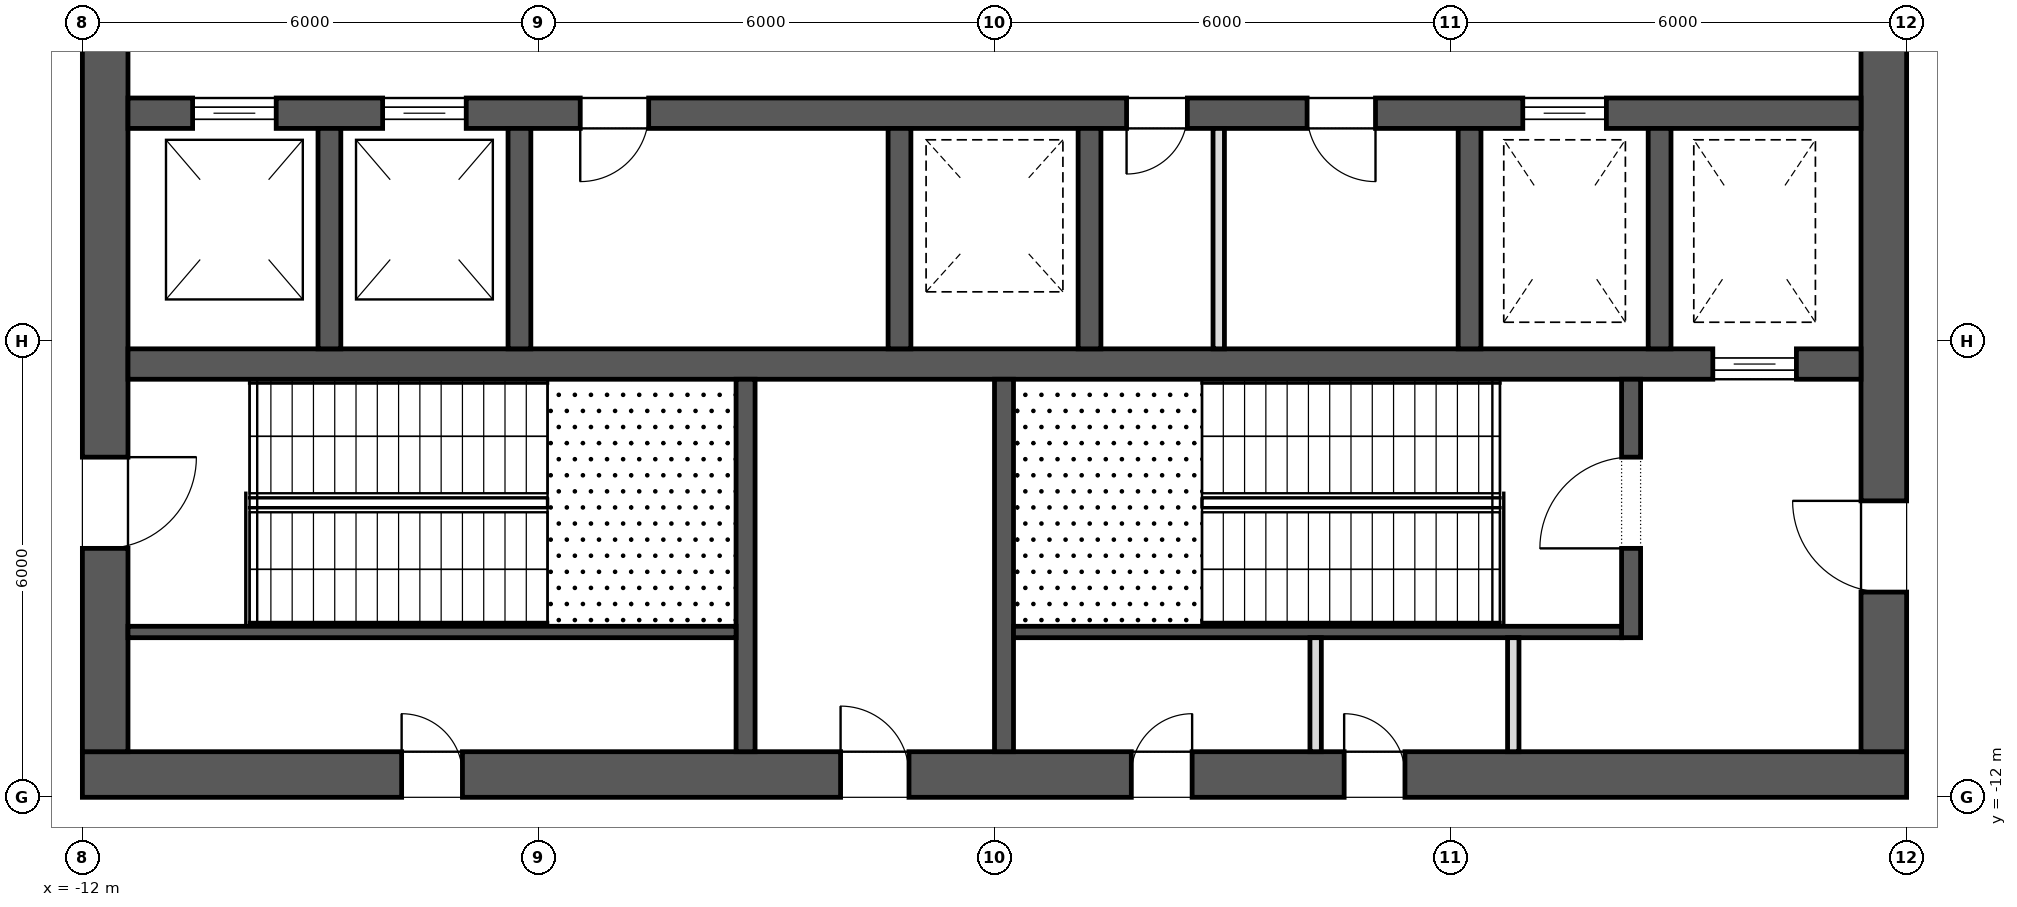
"""IFC4 building model, lengths in metres.
Left out: names, types, materials, properties, quantities, classifications, styles, units other than length and angle.
Written with IfcOpenShell. Run it as: python <this file> out.ifc"""

import sys

from ifc_helpers import new_model, si_unit, direction, frame, frame_2d, origin, place, context, subcontext, project, spatial, rectangle, extrude, element, fill, save


model = new_model("IFC4")
c1 = context("Model", 3, precision=1e-05, world=origin(), true_north=direction((0.0, 1.0)))
c2 = subcontext(c1, "Body", "Model", "MODEL_VIEW")
j1 = project(units=[si_unit("LENGTHUNIT", "METRE"), si_unit("PLANEANGLEUNIT", "RADIAN")], contexts=[c1])
p1 = place(None, origin())
s1 = spatial("IfcSite", under=j1, at=p1, CompositionType="ELEMENT")
p2 = place(p1, origin())
s2 = spatial("IfcBuilding", under=s1, at=p2, CompositionType="ELEMENT")
p3 = place(p2, frame((0.0, 0.0, 333.3)))
s3 = spatial("IfcBuildingStorey", under=s2, at=p3, CompositionType="ELEMENT", Elevation=333.3)
p4 = place(p3, frame((-12.0, -11.7, 0.0), z_axis=(0.0, 0.0, 1.0), x_axis=(1.0, 0.0, 0.0)))
e1 = element("IfcWall", 1, at=p4, inside=s3, PredefinedType="SHEAR", context=c2, shape_type="SweptSolid", body=[
    extrude(rectangle(XDim=24.0, YDim=0.6, at=frame_2d((12.0, 0.0))), origin(), (0.0, 0.0, 1.0), 5.0),
])
p5 = place(p4, frame((9.975, 0.0, 0.0)))
e2 = element("IfcOpeningElement", 2, at=p5, cuts=e1, PredefinedType="OPENING", context=c2, shape_type="SweptSolid", body=[
    extrude(rectangle(XDim=0.9, YDim=2.1, at=frame_2d((0.45, 1.05))), frame((0.0, 0.312, 0.0), z_axis=(0.0, -1.0, 0.0), x_axis=(1.0, 0.0, 0.0)), (0.0, 0.0, 1.0), 0.624),
])
p6 = place(p4, frame((4.2, 0.0, 0.0)))
e3 = element("IfcOpeningElement", 3, at=p6, cuts=e1, PredefinedType="OPENING", context=c2, shape_type="SweptSolid", body=[
    extrude(rectangle(XDim=0.8, YDim=2.1, at=frame_2d((0.4, 1.05))), frame((0.0, 0.312, 0.0), z_axis=(0.0, -1.0, 0.0), x_axis=(1.0, 0.0, 0.0)), (0.0, 0.0, 1.0), 0.624),
])
p7 = place(p4, frame((13.8, 0.0, 0.0)))
e4 = element("IfcOpeningElement", 4, at=p7, cuts=e1, PredefinedType="OPENING", context=c2, shape_type="SweptSolid", body=[
    extrude(rectangle(XDim=0.8, YDim=2.1, at=frame_2d((0.4, 1.05))), frame((0.0, 0.312, 0.0), z_axis=(0.0, -1.0, 0.0), x_axis=(1.0, 0.0, 0.0)), (0.0, 0.0, 1.0), 0.624),
])
p8 = place(p4, frame((16.6, 0.0, 0.0)))
e5 = element("IfcOpeningElement", 5, at=p8, cuts=e1, PredefinedType="OPENING", context=c2, shape_type="SweptSolid", body=[
    extrude(rectangle(XDim=0.8, YDim=2.1, at=frame_2d((0.4, 1.05))), frame((0.0, 0.312, 0.0), z_axis=(0.0, -1.0, 0.0), x_axis=(1.0, 0.0, 0.0)), (0.0, 0.0, 1.0), 0.624),
])
p9 = place(p3, frame((11.7, -11.4, 0.0), z_axis=(0.0, 0.0, 1.0), x_axis=(0.0, 1.0, 0.0)))
e6 = element("IfcWall", 6, at=p9, inside=s3, PredefinedType="SHEAR", context=c2, shape_type="SweptSolid", body=[
    extrude(rectangle(XDim=22.8, YDim=0.6, at=frame_2d((11.4, 0.0))), origin(), (0.0, 0.0, 1.0), 5.0),
])
p10 = place(p9, frame((10.2, 0.0, 0.0)))
e7 = element("IfcOpeningElement", 7, at=p10, cuts=e6, PredefinedType="OPENING", context=c2, shape_type="SweptSolid", body=[
    extrude(rectangle(XDim=2.4, YDim=2.1, at=frame_2d((1.2, 1.05))), frame((0.0, 0.312, 0.0), z_axis=(0.0, -1.0, 0.0), x_axis=(1.0, 0.0, 0.0)), (0.0, 0.0, 1.0), 0.624),
])
p11 = place(p9, frame((19.5, 0.0, 0.0)))
e8 = element("IfcOpeningElement", 8, at=p11, cuts=e6, PredefinedType="OPENING", context=c2, shape_type="SweptSolid", body=[
    extrude(rectangle(XDim=1.2, YDim=2.1, at=frame_2d((0.6, 1.05))), frame((0.0, 0.312, 0.0), z_axis=(0.0, -1.0, 0.0), x_axis=(1.0, 0.0, 0.0)), (0.0, 0.0, 1.0), 0.624),
])
p12 = place(p9, frame((2.1, 0.0, 0.0)))
e9 = element("IfcOpeningElement", 9, at=p12, cuts=e6, PredefinedType="OPENING", context=c2, shape_type="SweptSolid", body=[
    extrude(rectangle(XDim=1.2, YDim=2.1, at=frame_2d((0.6, 1.05))), frame((0.0, 0.312, 0.0), z_axis=(0.0, -1.0, 0.0), x_axis=(1.0, 0.0, 0.0)), (0.0, 0.0, 1.0), 0.624),
])
p13 = place(p3, frame((-11.7, -11.4, 0.0), z_axis=(0.0, 0.0, 1.0), x_axis=(0.0, 1.0, 0.0)))
e10 = element("IfcWall", 10, at=p13, inside=s3, PredefinedType="SHEAR", context=c2, shape_type="SweptSolid", body=[
    extrude(rectangle(XDim=22.8, YDim=0.6, at=frame_2d((11.4, 0.0))), origin(), (0.0, 0.0, 1.0), 5.0),
])
p14 = place(p13, frame((10.2, 0.0, 0.0)))
e11 = element("IfcOpeningElement", 11, at=p14, cuts=e10, PredefinedType="OPENING", context=c2, shape_type="SweptSolid", body=[
    extrude(rectangle(XDim=2.4, YDim=2.1, at=frame_2d((1.2, 1.05))), frame((0.0, 0.312, 0.0), z_axis=(0.0, -1.0, 0.0), x_axis=(1.0, 0.0, 0.0)), (0.0, 0.0, 1.0), 0.624),
])
p15 = place(p13, frame((18.925, 0.0, 0.0)))
e12 = element("IfcOpeningElement", 12, at=p15, cuts=e10, PredefinedType="OPENING", context=c2, shape_type="SweptSolid", body=[
    extrude(rectangle(XDim=1.2, YDim=2.1, at=frame_2d((0.6, 1.05))), frame((0.0, 0.312, 0.0), z_axis=(0.0, -1.0, 0.0), x_axis=(1.0, 0.0, 0.0)), (0.0, 0.0, 1.0), 0.624),
])
p16 = place(p13, frame((2.675, 0.0, 0.0)))
e13 = element("IfcOpeningElement", 13, at=p16, cuts=e10, PredefinedType="OPENING", context=c2, shape_type="SweptSolid", body=[
    extrude(rectangle(XDim=1.2, YDim=2.1, at=frame_2d((0.6, 1.05))), frame((0.0, 0.312, 0.0), z_axis=(0.0, -1.0, 0.0), x_axis=(1.0, 0.0, 0.0)), (0.0, 0.0, 1.0), 0.624),
])
p17 = place(p3, frame((-11.4, -3.0, 0.0), z_axis=(0.0, 0.0, 1.0), x_axis=(1.0, 0.0, 0.0)))
e14 = element("IfcWall", 14, at=p17, inside=s3, PredefinedType="SHEAR", context=c2, shape_type="SweptSolid", body=[
    extrude(rectangle(XDim=22.8, YDim=0.4, at=frame_2d((11.4, 0.0))), origin(), (0.0, 0.0, 1.0), 5.0),
])
p18 = place(p17, frame((0.85, 0.0, 0.0)))
e15 = element("IfcOpeningElement", 15, at=p18, cuts=e14, PredefinedType="OPENING", context=c2, shape_type="SweptSolid", body=[
    extrude(rectangle(XDim=1.1, YDim=2.1, at=frame_2d((0.55, 1.05))), frame((0.0, 0.212, 0.0), z_axis=(0.0, -1.0, 0.0), x_axis=(1.0, 0.0, 0.0)), (0.0, 0.0, 1.0), 0.424),
])
p19 = place(p17, frame((3.35, 0.0, 0.0)))
e16 = element("IfcOpeningElement", 16, at=p19, cuts=e14, PredefinedType="OPENING", context=c2, shape_type="SweptSolid", body=[
    extrude(rectangle(XDim=1.1, YDim=2.1, at=frame_2d((0.55, 1.05))), frame((0.0, 0.212, 0.0), z_axis=(0.0, -1.0, 0.0), x_axis=(1.0, 0.0, 0.0)), (0.0, 0.0, 1.0), 0.424),
])
p20 = place(p17, frame((18.35, 0.0, 0.0)))
e17 = element("IfcOpeningElement", 17, at=p20, cuts=e14, PredefinedType="OPENING", context=c2, shape_type="SweptSolid", body=[
    extrude(rectangle(XDim=1.1, YDim=2.1, at=frame_2d((0.55, 1.05))), frame((0.0, 0.212, 0.0), z_axis=(0.0, -1.0, 0.0), x_axis=(1.0, 0.0, 0.0)), (0.0, 0.0, 1.0), 0.424),
])
p21 = place(p17, frame((13.137, 0.0, 0.0)))
e18 = element("IfcOpeningElement", 18, at=p21, cuts=e14, PredefinedType="OPENING", context=c2, shape_type="SweptSolid", body=[
    extrude(rectangle(XDim=0.8, YDim=2.1, at=frame_2d((0.4, 1.05))), frame((0.0, 0.212, 0.0), z_axis=(0.0, -1.0, 0.0), x_axis=(1.0, 0.0, 0.0)), (0.0, 0.0, 1.0), 0.424),
])
p22 = place(p17, frame((15.512, 0.0, 0.0)))
e19 = element("IfcOpeningElement", 19, at=p22, cuts=e14, PredefinedType="OPENING", context=c2, shape_type="SweptSolid", body=[
    extrude(rectangle(XDim=0.9, YDim=2.1, at=frame_2d((0.45, 1.05))), frame((0.0, 0.212, 0.0), z_axis=(0.0, -1.0, 0.0), x_axis=(1.0, 0.0, 0.0)), (0.0, 0.0, 1.0), 0.424),
])
p23 = place(p17, frame((5.95, 0.0, 0.0)))
e20 = element("IfcOpeningElement", 20, at=p23, cuts=e14, PredefinedType="OPENING", context=c2, shape_type="SweptSolid", body=[
    extrude(rectangle(XDim=0.9, YDim=2.1, at=frame_2d((0.45, 1.05))), frame((0.0, 0.212, 0.0), z_axis=(0.0, -1.0, 0.0), x_axis=(1.0, 0.0, 0.0)), (0.0, 0.0, 1.0), 0.424),
])
p24 = place(p3, frame((-11.4, -6.3, 0.0), z_axis=(0.0, 0.0, 1.0), x_axis=(1.0, 0.0, 0.0)))
e21 = element("IfcWall", 21, at=p24, inside=s3, PredefinedType="SHEAR", context=c2, shape_type="SweptSolid", body=[
    extrude(rectangle(XDim=22.8, YDim=0.4, at=frame_2d((11.4, 0.0))), origin(), (0.0, 0.0, 1.0), 5.0),
])
p25 = place(p24, frame((20.85, 0.0, 0.0)))
e22 = element("IfcOpeningElement", 22, at=p25, cuts=e21, PredefinedType="OPENING", context=c2, shape_type="SweptSolid", body=[
    extrude(rectangle(XDim=1.1, YDim=2.1, at=frame_2d((0.55, 1.05))), frame((0.0, 0.212, 0.0), z_axis=(0.0, -1.0, 0.0), x_axis=(1.0, 0.0, 0.0)), (0.0, 0.0, 1.0), 0.424),
])
for number, where, z_axis, x_axis in (
    (23, (-8.75, -6.1, 0.0), (0.0, 0.0, 1.0), (0.0, 1.0, 0.0)),
    (24, (-6.25, -6.1, 0.0), (0.0, 0.0, 1.0), (0.0, 1.0, 0.0)),
    (25, (-1.25, -6.1, 0.0), (0.0, 0.0, 1.0), (0.0, 1.0, 0.0)),
    (26, (1.25, -6.1, 0.0), (0.0, 0.0, 1.0), (0.0, 1.0, 0.0)),
    (27, (6.25, -6.1, 0.0), (0.0, 0.0, 1.0), (0.0, 1.0, 0.0)),
    (28, (8.75, -6.1, 0.0), (0.0, 0.0, 1.0), (0.0, 1.0, 0.0)),
):
    element("IfcWall", number, at=place(p3, frame(where, z_axis=z_axis, x_axis=x_axis)), inside=s3, PredefinedType="SHEAR", context=c2, shape_type="SweptSolid", body=[
        extrude(rectangle(XDim=2.9, YDim=0.3, at=frame_2d((1.45, 0.0))), origin(), (0.0, 0.0, 1.0), 5.0),
    ])
for number, where, z_axis, x_axis in (
    (29, (-3.275, -11.4, 0.0), (0.0, 0.0, 1.0), (0.0, 1.0, 0.0)),
    (30, (0.125, -11.4, 0.0), (0.0, 0.0, 1.0), (0.0, 1.0, 0.0)),
):
    element("IfcWall", number, at=place(p3, frame(where, z_axis=z_axis, x_axis=x_axis)), inside=s3, PredefinedType="SHEAR", context=c2, shape_type="SweptSolid", body=[
        extrude(rectangle(XDim=4.9, YDim=0.25, at=frame_2d((2.45, 0.0))), origin(), (0.0, 0.0, 1.0), 4.65),
    ])
p26 = place(p3, frame((8.375, -9.9, 0.0), z_axis=(0.0, 0.0, 1.0), x_axis=(0.0, 1.0, 0.0)))
e31 = element("IfcWall", 31, at=p26, inside=s3, PredefinedType="SHEAR", context=c2, shape_type="SweptSolid", body=[
    extrude(rectangle(XDim=3.4, YDim=0.25, at=frame_2d((1.7, 0.0))), origin(), (0.0, 0.0, 1.0), 4.65),
])
p27 = place(p26, frame((1.175, 0.0, 0.0)))
e32 = element("IfcOpeningElement", 32, at=p27, cuts=e31, PredefinedType="OPENING", context=c2, shape_type="SweptSolid", body=[
    extrude(rectangle(XDim=1.2, YDim=2.1, at=frame_2d((0.6, 1.05))), frame((0.0, 0.137, 0.0), z_axis=(0.0, -1.0, 0.0), x_axis=(1.0, 0.0, 0.0)), (0.0, 0.0, 1.0), 0.274),
])
for number, where, z_axis, x_axis in (
    (33, (-11.4, -9.825, 0.0), (0.0, 0.0, 1.0), (1.0, 0.0, 0.0)),
    (34, (0.25, -9.825, 0.0), (0.0, 0.0, 1.0), (1.0, 0.0, 0.0)),
):
    element("IfcWall", number, at=place(p3, frame(where, z_axis=z_axis, x_axis=x_axis)), inside=s3, PredefinedType="SHEAR", context=c2, shape_type="SweptSolid", body=[
        extrude(rectangle(XDim=8.0, YDim=0.15, at=frame_2d((4.0, 0.0))), origin(), (0.0, 0.0, 1.0), 4.65),
    ])
for number, where, z_axis, x_axis in (
    (35, (4.225, -11.4, 0.0), (0.0, 0.0, 1.0), (0.0, 1.0, 0.0)),
    (36, (6.825, -11.4, 0.0), (0.0, 0.0, 1.0), (0.0, 1.0, 0.0)),
):
    element("IfcWall", number, at=place(p3, frame(where, z_axis=z_axis, x_axis=x_axis)), inside=s3, PredefinedType="PARTITIONING", context=c2, shape_type="SweptSolid", body=[
        extrude(rectangle(XDim=1.5, YDim=0.15, at=frame_2d((0.75, 0.0))), origin(), (0.0, 0.0, 1.0), 4.65),
    ])
p28 = place(p3, frame((2.95, -6.1, 0.0), z_axis=(0.0, 0.0, 1.0), x_axis=(0.0, 1.0, 0.0)))
e37 = element("IfcWall", 37, at=p28, inside=s3, PredefinedType="PARTITIONING", context=c2, shape_type="SweptSolid", body=[
    extrude(rectangle(XDim=2.9, YDim=0.15, at=frame_2d((1.45, 0.0))), origin(), (0.0, 0.0, 1.0), 4.65),
])
p29 = place(p25, origin())
e38 = element("IfcDoor", 38, at=p29, inside=s3, OperationType="SLIDING_TO_LEFT", PredefinedType="DOOR", context=c2, shape_type="SweptSolid", body=[
    extrude(rectangle(XDim=1.1, YDim=2.1, at=frame_2d((0.55, 1.05))), frame((0.0, 0.025, 0.0), z_axis=(0.0, -1.0, 0.0), x_axis=(1.0, 0.0, 0.0)), (0.0, 0.0, 1.0), 0.05),
])
fill(e22, e38)
p30 = place(p18, origin())
e39 = element("IfcDoor", 39, at=p30, inside=s3, OperationType="SLIDING_TO_LEFT", PredefinedType="DOOR", context=c2, shape_type="SweptSolid", body=[
    extrude(rectangle(XDim=1.1, YDim=2.1, at=frame_2d((0.55, 1.05))), frame((0.0, 0.025, 0.0), z_axis=(0.0, -1.0, 0.0), x_axis=(1.0, 0.0, 0.0)), (0.0, 0.0, 1.0), 0.05),
])
fill(e15, e39)
p31 = place(p19, origin())
e40 = element("IfcDoor", 40, at=p31, inside=s3, OperationType="SLIDING_TO_LEFT", PredefinedType="DOOR", context=c2, shape_type="SweptSolid", body=[
    extrude(rectangle(XDim=1.1, YDim=2.1, at=frame_2d((0.55, 1.05))), frame((0.0, 0.025, 0.0), z_axis=(0.0, -1.0, 0.0), x_axis=(1.0, 0.0, 0.0)), (0.0, 0.0, 1.0), 0.05),
])
fill(e16, e40)
p32 = place(p20, origin())
e41 = element("IfcDoor", 41, at=p32, inside=s3, OperationType="SLIDING_TO_LEFT", PredefinedType="DOOR", context=c2, shape_type="SweptSolid", body=[
    extrude(rectangle(XDim=1.1, YDim=2.1, at=frame_2d((0.55, 1.05))), frame((0.0, 0.025, 0.0), z_axis=(0.0, -1.0, 0.0), x_axis=(1.0, 0.0, 0.0)), (0.0, 0.0, 1.0), 0.05),
])
fill(e17, e41)
p33 = place(p16, frame((1.2, 0.0, 0.0), z_axis=(0.0, 0.0, 1.0), x_axis=(-1.0, 0.0, 0.0)))
e42 = element("IfcDoor", 42, at=p33, inside=s3, OperationType="SINGLE_SWING_RIGHT", PredefinedType="DOOR", context=c2, shape_type="SweptSolid", body=[
    extrude(rectangle(XDim=1.2, YDim=2.1, at=frame_2d((0.6, 1.05))), frame((0.0, 0.025, 0.0), z_axis=(0.0, -1.0, 0.0), x_axis=(1.0, 0.0, 0.0)), (0.0, 0.0, 1.0), 0.05),
])
fill(e13, e42)
p34 = place(p27, origin())
e43 = element("IfcDoor", 43, at=p34, inside=s3, OperationType="SINGLE_SWING_RIGHT", PredefinedType="DOOR", context=c2, shape_type="SweptSolid", body=[
    extrude(rectangle(XDim=1.2, YDim=2.1, at=frame_2d((0.6, 1.05))), frame((0.0, 0.025, 0.0), z_axis=(0.0, -1.0, 0.0), x_axis=(1.0, 0.0, 0.0)), (0.0, 0.0, 1.0), 0.05),
])
fill(e32, e43)
p35 = place(p12, origin())
e44 = element("IfcDoor", 44, at=p35, inside=s3, OperationType="SINGLE_SWING_LEFT", PredefinedType="DOOR", context=c2, shape_type="SweptSolid", body=[
    extrude(rectangle(XDim=1.2, YDim=2.1, at=frame_2d((0.6, 1.05))), frame((0.0, 0.025, 0.0), z_axis=(0.0, -1.0, 0.0), x_axis=(1.0, 0.0, 0.0)), (0.0, 0.0, 1.0), 0.05),
])
fill(e9, e44)
p36 = place(p5, origin())
e45 = element("IfcDoor", 45, at=p36, inside=s3, OperationType="SINGLE_SWING_RIGHT", PredefinedType="DOOR", context=c2, shape_type="SweptSolid", body=[
    extrude(rectangle(XDim=0.9, YDim=2.1, at=frame_2d((0.45, 1.05))), frame((0.0, 0.025, 0.0), z_axis=(0.0, -1.0, 0.0), x_axis=(1.0, 0.0, 0.0)), (0.0, 0.0, 1.0), 0.05),
])
fill(e2, e45)
p37 = place(p6, origin())
e46 = element("IfcDoor", 46, at=p37, inside=s3, OperationType="SINGLE_SWING_RIGHT", PredefinedType="DOOR", context=c2, shape_type="SweptSolid", body=[
    extrude(rectangle(XDim=0.8, YDim=2.1, at=frame_2d((0.4, 1.05))), frame((0.0, 0.025, 0.0), z_axis=(0.0, -1.0, 0.0), x_axis=(1.0, 0.0, 0.0)), (0.0, 0.0, 1.0), 0.05),
])
fill(e3, e46)
p38 = place(p7, origin())
e47 = element("IfcDoor", 47, at=p38, inside=s3, OperationType="SINGLE_SWING_LEFT", PredefinedType="DOOR", context=c2, shape_type="SweptSolid", body=[
    extrude(rectangle(XDim=0.8, YDim=2.1, at=frame_2d((0.4, 1.05))), frame((0.0, 0.025, 0.0), z_axis=(0.0, -1.0, 0.0), x_axis=(1.0, 0.0, 0.0)), (0.0, 0.0, 1.0), 0.05),
])
fill(e4, e47)
p39 = place(p8, origin())
e48 = element("IfcDoor", 48, at=p39, inside=s3, OperationType="SINGLE_SWING_RIGHT", PredefinedType="DOOR", context=c2, shape_type="SweptSolid", body=[
    extrude(rectangle(XDim=0.8, YDim=2.1, at=frame_2d((0.4, 1.05))), frame((0.0, 0.025, 0.0), z_axis=(0.0, -1.0, 0.0), x_axis=(1.0, 0.0, 0.0)), (0.0, 0.0, 1.0), 0.05),
])
fill(e5, e48)
p40 = place(p21, frame((0.8, 0.0, 0.0), z_axis=(0.0, 0.0, 1.0), x_axis=(-1.0, 0.0, 0.0)))
e49 = element("IfcDoor", 49, at=p40, inside=s3, OperationType="SINGLE_SWING_LEFT", PredefinedType="DOOR", context=c2, shape_type="SweptSolid", body=[
    extrude(rectangle(XDim=0.8, YDim=2.1, at=frame_2d((0.4, 1.05))), frame((0.0, 0.025, 0.0), z_axis=(0.0, -1.0, 0.0), x_axis=(1.0, 0.0, 0.0)), (0.0, 0.0, 1.0), 0.05),
])
fill(e18, e49)
p41 = place(p22, frame((0.9, 0.0, 0.0), z_axis=(0.0, 0.0, 1.0), x_axis=(-1.0, 0.0, 0.0)))
e50 = element("IfcDoor", 50, at=p41, inside=s3, OperationType="SINGLE_SWING_RIGHT", PredefinedType="DOOR", context=c2, shape_type="SweptSolid", body=[
    extrude(rectangle(XDim=0.9, YDim=2.1, at=frame_2d((0.45, 1.05))), frame((0.0, 0.025, 0.0), z_axis=(0.0, -1.0, 0.0), x_axis=(1.0, 0.0, 0.0)), (0.0, 0.0, 1.0), 0.05),
])
fill(e19, e50)
p42 = place(p23, frame((0.9, 0.0, 0.0), z_axis=(0.0, 0.0, 1.0), x_axis=(-1.0, 0.0, 0.0)))
e51 = element("IfcDoor", 51, at=p42, inside=s3, OperationType="SINGLE_SWING_LEFT", PredefinedType="DOOR", context=c2, shape_type="SweptSolid", body=[
    extrude(rectangle(XDim=0.9, YDim=2.1, at=frame_2d((0.45, 1.05))), frame((0.0, 0.025, 0.0), z_axis=(0.0, -1.0, 0.0), x_axis=(1.0, 0.0, 0.0)), (0.0, 0.0, 1.0), 0.05),
])
fill(e20, e51)
save(model, sys.argv[1])
